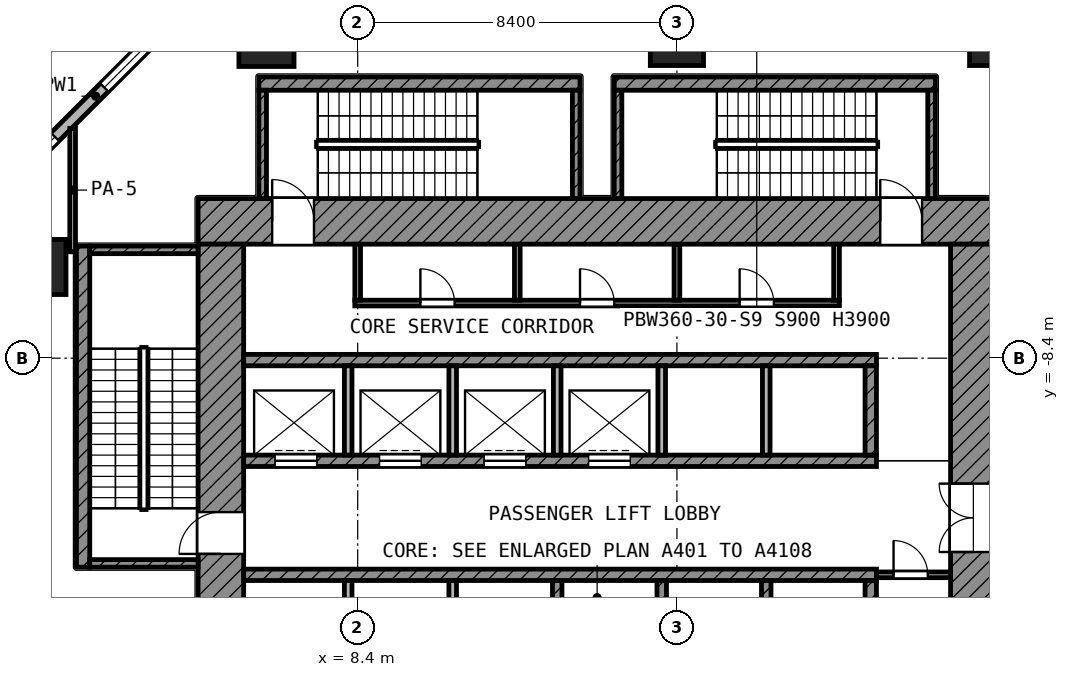
"""IFC4 building model, lengths in metres.
Left out: names, types, materials, properties, quantities, classifications, styles, units other than length and angle.
Written with IfcOpenShell. Run it as: python <this file> out.ifc"""

import sys

from ifc_helpers import new_model, si_unit, direction, frame, frame_2d, origin, origin_2d, place, context, subcontext, project, spatial, rectangle, extrude, element, fill, save


model = new_model("IFC4")
c1 = context("Model", 3, precision=1e-05, world=origin(), true_north=direction((0.0, 1.0)))
c2 = subcontext(c1, "Body", "Model", "MODEL_VIEW")
j1 = project(units=[si_unit("LENGTHUNIT", "METRE"), si_unit("PLANEANGLEUNIT", "RADIAN")], contexts=[c1])
p1 = place(None, origin())
s1 = spatial("IfcSite", under=j1, at=p1, CompositionType="ELEMENT")
p2 = place(p1, origin())
s2 = spatial("IfcBuilding", under=s1, at=p2, CompositionType="ELEMENT")
p3 = place(p2, frame((0.0, 0.0, 12.6)))
s3 = spatial("IfcBuildingStorey", under=s2, at=p3, CompositionType="ELEMENT", Elevation=12.6)
p4 = place(p3, frame((6.0, 0.0, 0.0), z_axis=(0.0, 0.0, 1.0), x_axis=(1.0, 0.0, 0.0)))
e1 = element("IfcColumn", 1, at=p4, inside=s3, PredefinedType="COLUMN", context=c2, shape_type="SweptSolid", body=[
    extrude(rectangle(XDim=1.45, YDim=1.45, at=origin_2d()), origin(), (0.0, 0.0, 1.0), 5.6),
])
for number, where, z_axis, x_axis in (
    (2, (16.8, 0.0, 0.0), (0.0, 0.0, 1.0), (1.0, 0.0, 0.0)),
    (3, (25.2, 0.0, 0.0), (0.0, 0.0, 1.0), (1.0, 0.0, 0.0)),
):
    element("IfcColumn", number, at=place(p3, frame(where, z_axis=z_axis, x_axis=x_axis)), inside=s3, PredefinedType="COLUMN", context=c2, shape_type="SweptSolid", body=[
        extrude(rectangle(XDim=1.4, YDim=1.4, at=origin_2d()), origin(), (0.0, 0.0, 1.0), 5.6),
    ])
p5 = place(p3, frame((0.0, -6.0, 0.0), z_axis=(0.0, 0.0, 1.0), x_axis=(1.0, 0.0, 0.0)))
e4 = element("IfcColumn", 4, at=p5, inside=s3, PredefinedType="COLUMN", context=c2, shape_type="SweptSolid", body=[
    extrude(rectangle(XDim=1.45, YDim=1.45, at=origin_2d()), origin(), (0.0, 0.0, 1.0), 5.6),
])
p6 = place(p3, frame((4.462, 1.45, 0.0), z_axis=(0.0, 0.0, 1.0), x_axis=(-0.707106781187, -0.707106781187, 0.0)))
e5 = element("IfcWall", 5, at=p6, inside=s3, PredefinedType="SOLIDWALL", context=c2, shape_type="SweptSolid", body=[
    extrude(rectangle(XDim=8.361, YDim=0.3, at=frame_2d((4.181, 0.0))), origin(), (0.0, 0.0, 1.0), 5.25),
])
p7 = place(p6, frame((0.259, 0.0, 0.9)))
e6 = element("IfcOpeningElement", 6, at=p7, cuts=e5, PredefinedType="OPENING", context=c2, shape_type="SweptSolid", body=[
    extrude(rectangle(XDim=3.6, YDim=3.0, at=frame_2d((1.8, 1.5))), frame((0.0, 0.16, 0.0), z_axis=(0.0, -1.0, 0.0), x_axis=(1.0, 0.0, 0.0)), (0.0, 0.0, 1.0), 0.32),
])
p8 = place(p6, frame((5.694, 0.0, 0.9)))
e7 = element("IfcOpeningElement", 7, at=p8, cuts=e5, PredefinedType="OPENING", context=c2, shape_type="SweptSolid", body=[
    extrude(rectangle(XDim=2.4, YDim=3.0, at=frame_2d((1.2, 1.5))), frame((0.0, 0.16, 0.0), z_axis=(0.0, -1.0, 0.0), x_axis=(1.0, 0.0, 0.0)), (0.0, 0.0, 1.0), 0.32),
])
p9 = place(p3, frame((4.2, -4.8, 0.0), z_axis=(0.0, 0.0, 1.0), x_axis=(1.0, 0.0, 0.0)))
e8 = element("IfcWall", 8, at=p9, inside=s3, PredefinedType="SHEAR", context=c2, shape_type="SweptSolid", body=[
    extrude(rectangle(XDim=21.0, YDim=1.2, at=frame_2d((10.5, 0.0))), origin(), (0.0, 0.0, 1.0), 5.25),
])
p10 = place(p9, frame((1.95, 0.0, 0.0)))
e9 = element("IfcOpeningElement", 9, at=p10, cuts=e8, PredefinedType="OPENING", context=c2, shape_type="SweptSolid", body=[
    extrude(rectangle(XDim=1.1, YDim=2.1, at=frame_2d((0.55, 1.05))), frame((0.0, 0.61, 0.0), z_axis=(0.0, -1.0, 0.0), x_axis=(1.0, 0.0, 0.0)), (0.0, 0.0, 1.0), 1.22),
])
p11 = place(p9, frame((17.95, 0.0, 0.0)))
e10 = element("IfcOpeningElement", 10, at=p11, cuts=e8, PredefinedType="OPENING", context=c2, shape_type="SweptSolid", body=[
    extrude(rectangle(XDim=1.1, YDim=2.1, at=frame_2d((0.55, 1.05))), frame((0.0, 0.61, 0.0), z_axis=(0.0, -1.0, 0.0), x_axis=(1.0, 0.0, 0.0)), (0.0, 0.0, 1.0), 1.22),
])
p12 = place(p3, frame((4.8, -25.2, 0.0), z_axis=(0.0, 0.0, 1.0), x_axis=(0.0, 1.0, 0.0)))
e11 = element("IfcWall", 11, at=p12, inside=s3, PredefinedType="SHEAR", context=c2, shape_type="SweptSolid", body=[
    extrude(rectangle(XDim=19.8, YDim=1.2, at=frame_2d((9.9, 0.0))), origin(), (0.0, 0.0, 1.0), 5.25),
])
p13 = place(p12, frame((11.65, 0.0, 0.0)))
e12 = element("IfcOpeningElement", 12, at=p13, cuts=e11, PredefinedType="OPENING", context=c2, shape_type="SweptSolid", body=[
    extrude(rectangle(XDim=1.1, YDim=2.1, at=frame_2d((0.55, 1.05))), frame((0.0, 0.61, 0.0), z_axis=(0.0, -1.0, 0.0), x_axis=(1.0, 0.0, 0.0)), (0.0, 0.0, 1.0), 1.22),
])
p14 = place(p12, frame((2.35, 0.0, 0.0)))
e13 = element("IfcOpeningElement", 13, at=p14, cuts=e11, PredefinedType="OPENING", context=c2, shape_type="SweptSolid", body=[
    extrude(rectangle(XDim=1.1, YDim=2.1, at=frame_2d((0.55, 1.05))), frame((0.0, 0.61, 0.0), z_axis=(0.0, -1.0, 0.0), x_axis=(1.0, 0.0, 0.0)), (0.0, 0.0, 1.0), 1.22),
])
p15 = place(p3, frame((24.6, -24.0, 0.0), z_axis=(0.0, 0.0, 1.0), x_axis=(0.0, 1.0, 0.0)))
e14 = element("IfcWall", 14, at=p15, inside=s3, PredefinedType="SHEAR", context=c2, shape_type="SweptSolid", body=[
    extrude(rectangle(XDim=18.6, YDim=1.2, at=frame_2d((9.3, 0.0))), origin(), (0.0, 0.0, 1.0), 5.25),
])
p16 = place(p15, frame((10.5, 0.0, 0.0)))
e15 = element("IfcOpeningElement", 15, at=p16, cuts=e14, PredefinedType="OPENING", context=c2, shape_type="SweptSolid", body=[
    extrude(rectangle(XDim=1.8, YDim=2.1, at=frame_2d((0.9, 1.05))), frame((0.0, 0.61, 0.0), z_axis=(0.0, -1.0, 0.0), x_axis=(1.0, 0.0, 0.0)), (0.0, 0.0, 1.0), 1.22),
])
p17 = place(p3, frame((5.4, -8.45, 0.0), z_axis=(0.0, 0.0, 1.0), x_axis=(1.0, 0.0, 0.0)))
e16 = element("IfcWall", 16, at=p17, inside=s3, PredefinedType="SHEAR", context=c2, shape_type="SweptSolid", body=[
    extrude(rectangle(XDim=16.65, YDim=0.3, at=frame_2d((8.325, 0.0))), origin(), (0.0, 0.0, 1.0), 5.25),
])
p18 = place(p3, frame((5.4, -11.1, 0.0), z_axis=(0.0, 0.0, 1.0), x_axis=(1.0, 0.0, 0.0)))
e17 = element("IfcWall", 17, at=p18, inside=s3, PredefinedType="SHEAR", context=c2, shape_type="SweptSolid", body=[
    extrude(rectangle(XDim=16.65, YDim=0.3, at=frame_2d((8.325, 0.0))), origin(), (0.0, 0.0, 1.0), 5.25),
])
p19 = place(p18, frame((0.825, 0.0, 0.0)))
e18 = element("IfcOpeningElement", 18, at=p19, cuts=e17, PredefinedType="OPENING", context=c2, shape_type="SweptSolid", body=[
    extrude(rectangle(XDim=1.1, YDim=2.1, at=frame_2d((0.55, 1.05))), frame((0.0, 0.16, 0.0), z_axis=(0.0, -1.0, 0.0), x_axis=(1.0, 0.0, 0.0)), (0.0, 0.0, 1.0), 0.32),
])
p20 = place(p18, frame((3.575, 0.0, 0.0)))
e19 = element("IfcOpeningElement", 19, at=p20, cuts=e17, PredefinedType="OPENING", context=c2, shape_type="SweptSolid", body=[
    extrude(rectangle(XDim=1.1, YDim=2.1, at=frame_2d((0.55, 1.05))), frame((0.0, 0.16, 0.0), z_axis=(0.0, -1.0, 0.0), x_axis=(1.0, 0.0, 0.0)), (0.0, 0.0, 1.0), 0.32),
])
p21 = place(p18, frame((6.325, 0.0, 0.0)))
e20 = element("IfcOpeningElement", 20, at=p21, cuts=e17, PredefinedType="OPENING", context=c2, shape_type="SweptSolid", body=[
    extrude(rectangle(XDim=1.1, YDim=2.1, at=frame_2d((0.55, 1.05))), frame((0.0, 0.16, 0.0), z_axis=(0.0, -1.0, 0.0), x_axis=(1.0, 0.0, 0.0)), (0.0, 0.0, 1.0), 0.32),
])
p22 = place(p18, frame((9.075, 0.0, 0.0)))
e21 = element("IfcOpeningElement", 21, at=p22, cuts=e17, PredefinedType="OPENING", context=c2, shape_type="SweptSolid", body=[
    extrude(rectangle(XDim=1.1, YDim=2.1, at=frame_2d((0.55, 1.05))), frame((0.0, 0.16, 0.0), z_axis=(0.0, -1.0, 0.0), x_axis=(1.0, 0.0, 0.0)), (0.0, 0.0, 1.0), 0.32),
])
p23 = place(p3, frame((5.4, -14.1, 0.0), z_axis=(0.0, 0.0, 1.0), x_axis=(1.0, 0.0, 0.0)))
e22 = element("IfcWall", 22, at=p23, inside=s3, PredefinedType="SHEAR", context=c2, shape_type="SweptSolid", body=[
    extrude(rectangle(XDim=16.65, YDim=0.3, at=frame_2d((8.325, 0.0))), origin(), (0.0, 0.0, 1.0), 5.25),
])
p24 = place(p3, frame((21.9, -10.95, 0.0), z_axis=(0.0, 0.0, 1.0), x_axis=(0.0, 1.0, 0.0)))
e23 = element("IfcWall", 23, at=p24, inside=s3, PredefinedType="SHEAR", context=c2, shape_type="SweptSolid", body=[
    extrude(rectangle(XDim=2.35, YDim=0.3, at=frame_2d((1.175, 0.0))), origin(), (0.0, 0.0, 1.0), 5.25),
])
p25 = place(p3, frame((21.9, -16.6, 0.0), z_axis=(0.0, 0.0, 1.0), x_axis=(0.0, 1.0, 0.0)))
e24 = element("IfcWall", 24, at=p25, inside=s3, PredefinedType="SHEAR", context=c2, shape_type="SweptSolid", body=[
    extrude(rectangle(XDim=2.35, YDim=0.3, at=frame_2d((1.175, 0.0))), origin(), (0.0, 0.0, 1.0), 5.25),
])
for number, where, z_axis, x_axis in (
    (25, (8.15, -10.95, 0.0), (0.0, 0.0, 1.0), (0.0, 1.0, 0.0)),
    (26, (10.9, -10.95, 0.0), (0.0, 0.0, 1.0), (0.0, 1.0, 0.0)),
    (27, (13.65, -10.95, 0.0), (0.0, 0.0, 1.0), (0.0, 1.0, 0.0)),
    (28, (16.4, -10.95, 0.0), (0.0, 0.0, 1.0), (0.0, 1.0, 0.0)),
    (29, (19.15, -10.95, 0.0), (0.0, 0.0, 1.0), (0.0, 1.0, 0.0)),
):
    element("IfcWall", number, at=place(p3, frame(where, z_axis=z_axis, x_axis=x_axis)), inside=s3, PredefinedType="PARTITIONING", context=c2, shape_type="SweptSolid", body=[
        extrude(rectangle(XDim=2.35, YDim=0.2, at=frame_2d((1.175, 0.0))), origin(), (0.0, 0.0, 1.0), 5.25),
    ])
for number, where, z_axis, x_axis in (
    (30, (8.15, -16.6, 0.0), (0.0, 0.0, 1.0), (0.0, 1.0, 0.0)),
    (31, (10.9, -16.6, 0.0), (0.0, 0.0, 1.0), (0.0, 1.0, 0.0)),
):
    element("IfcWall", number, at=place(p3, frame(where, z_axis=z_axis, x_axis=x_axis)), inside=s3, PredefinedType="PARTITIONING", context=c2, shape_type="SweptSolid", body=[
        extrude(rectangle(XDim=2.35, YDim=0.2, at=frame_2d((1.175, 0.0))), origin(), (0.0, 0.0, 1.0), 5.25),
    ])
for number, where, z_axis, x_axis in (
    (32, (13.65, -16.6, 0.0), (0.0, 0.0, 1.0), (0.0, 1.0, 0.0)),
    (33, (16.4, -16.6, 0.0), (0.0, 0.0, 1.0), (0.0, 1.0, 0.0)),
    (34, (19.15, -16.6, 0.0), (0.0, 0.0, 1.0), (0.0, 1.0, 0.0)),
):
    element("IfcWall", number, at=place(p3, frame(where, z_axis=z_axis, x_axis=x_axis)), inside=s3, PredefinedType="SHEAR", context=c2, shape_type="SweptSolid", body=[
        extrude(rectangle(XDim=2.35, YDim=0.25, at=frame_2d((1.175, 0.0))), origin(), (0.0, 0.0, 1.0), 5.25),
    ])
p26 = place(p3, frame((22.05, -14.1, 0.0), z_axis=(0.0, 0.0, 1.0), x_axis=(1.0, 0.0, 0.0)))
e35 = element("IfcWall", 35, at=p26, inside=s3, PredefinedType="PARTITIONING", context=c2, shape_type="SweptSolid", body=[
    extrude(rectangle(XDim=1.95, YDim=0.15, at=frame_2d((0.975, 0.0))), origin(), (0.0, 0.0, 1.0), 5.25),
])
p27 = place(p26, frame((0.45, 0.0, 0.0)))
e36 = element("IfcOpeningElement", 36, at=p27, cuts=e35, PredefinedType="OPENING", context=c2, shape_type="SweptSolid", body=[
    extrude(rectangle(XDim=0.9, YDim=2.1, at=frame_2d((0.45, 1.05))), frame((0.0, 0.085, 0.0), z_axis=(0.0, -1.0, 0.0), x_axis=(1.0, 0.0, 0.0)), (0.0, 0.0, 1.0), 0.17),
])
p28 = place(p3, frame((8.325, -6.95, 0.0), z_axis=(0.0, 0.0, 1.0), x_axis=(1.0, 0.0, 0.0)))
e37 = element("IfcWall", 37, at=p28, inside=s3, PredefinedType="PARTITIONING", context=c2, shape_type="SweptSolid", body=[
    extrude(rectangle(XDim=12.75, YDim=0.15, at=frame_2d((6.375, 0.0))), origin(), (0.0, 0.0, 1.0), 5.25),
])
p29 = place(p28, frame((1.725, 0.0, 0.0)))
e38 = element("IfcOpeningElement", 38, at=p29, cuts=e37, PredefinedType="OPENING", context=c2, shape_type="SweptSolid", body=[
    extrude(rectangle(XDim=0.9, YDim=2.1, at=frame_2d((0.45, 1.05))), frame((0.0, 0.085, 0.0), z_axis=(0.0, -1.0, 0.0), x_axis=(1.0, 0.0, 0.0)), (0.0, 0.0, 1.0), 0.17),
])
p30 = place(p28, frame((5.925, 0.0, 0.0)))
e39 = element("IfcOpeningElement", 39, at=p30, cuts=e37, PredefinedType="OPENING", context=c2, shape_type="SweptSolid", body=[
    extrude(rectangle(XDim=0.9, YDim=2.1, at=frame_2d((0.45, 1.05))), frame((0.0, 0.085, 0.0), z_axis=(0.0, -1.0, 0.0), x_axis=(1.0, 0.0, 0.0)), (0.0, 0.0, 1.0), 0.17),
])
p31 = place(p28, frame((10.125, 0.0, 0.0)))
e40 = element("IfcOpeningElement", 40, at=p31, cuts=e37, PredefinedType="OPENING", context=c2, shape_type="SweptSolid", body=[
    extrude(rectangle(XDim=0.9, YDim=2.1, at=frame_2d((0.45, 1.05))), frame((0.0, 0.085, 0.0), z_axis=(0.0, -1.0, 0.0), x_axis=(1.0, 0.0, 0.0)), (0.0, 0.0, 1.0), 0.17),
])
for number, where, z_axis, x_axis in (
    (41, (8.4, -6.875, 0.0), (0.0, 0.0, 1.0), (0.0, 1.0, 0.0)),
    (42, (12.6, -6.875, 0.0), (0.0, 0.0, 1.0), (0.0, 1.0, 0.0)),
    (43, (16.8, -6.875, 0.0), (0.0, 0.0, 1.0), (0.0, 1.0, 0.0)),
    (44, (21.0, -6.875, 0.0), (0.0, 0.0, 1.0), (0.0, 1.0, 0.0)),
):
    element("IfcWall", number, at=place(p3, frame(where, z_axis=z_axis, x_axis=x_axis)), inside=s3, PredefinedType="PARTITIONING", context=c2, shape_type="SweptSolid", body=[
        extrude(rectangle(XDim=1.475, YDim=0.15, at=frame_2d((0.738, 0.0))), origin(), (0.0, 0.0, 1.0), 5.25),
    ])
p32 = place(p3, frame((1.175, -13.9, 0.0), z_axis=(0.0, 0.0, 1.0), x_axis=(0.0, 1.0, 0.0)))
e45 = element("IfcWall", 45, at=p32, inside=s3, PredefinedType="SHEAR", context=c2, shape_type="SweptSolid", body=[
    extrude(rectangle(XDim=8.45, YDim=0.35, at=frame_2d((4.225, 0.0))), origin(), (0.0, 0.0, 1.0), 5.25),
])
for number, where, z_axis, x_axis in (
    (46, (1.35, -5.55, 0.0), (0.0, 0.0, 1.0), (1.0, 0.0, 0.0)),
    (47, (1.35, -13.8, 0.0), (0.0, 0.0, 1.0), (1.0, 0.0, 0.0)),
):
    element("IfcWall", number, at=place(p3, frame(where, z_axis=z_axis, x_axis=x_axis)), inside=s3, PredefinedType="SHEAR", context=c2, shape_type="SweptSolid", body=[
        extrude(rectangle(XDim=2.85, YDim=0.2, at=frame_2d((1.425, 0.0))), origin(), (0.0, 0.0, 1.0), 5.25),
    ])
p33 = place(p3, frame((5.8, -1.175, 0.0), z_axis=(0.0, 0.0, 1.0), x_axis=(1.0, 0.0, 0.0)))
e48 = element("IfcWall", 48, at=p33, inside=s3, PredefinedType="SHEAR", context=c2, shape_type="SweptSolid", body=[
    extrude(rectangle(XDim=8.45, YDim=0.35, at=frame_2d((4.225, 0.0))), origin(), (0.0, 0.0, 1.0), 5.25),
])
for number, where, z_axis, x_axis in (
    (49, (5.9, -4.2, 0.0), (0.0, 0.0, 1.0), (0.0, 1.0, 0.0)),
    (50, (14.15, -4.2, 0.0), (0.0, 0.0, 1.0), (0.0, 1.0, 0.0)),
):
    element("IfcWall", number, at=place(p3, frame(where, z_axis=z_axis, x_axis=x_axis)), inside=s3, PredefinedType="SHEAR", context=c2, shape_type="SweptSolid", body=[
        extrude(rectangle(XDim=2.85, YDim=0.2, at=frame_2d((1.425, 0.0))), origin(), (0.0, 0.0, 1.0), 5.25),
    ])
p34 = place(p3, frame((15.15, -1.175, 0.0), z_axis=(0.0, 0.0, 1.0), x_axis=(1.0, 0.0, 0.0)))
e51 = element("IfcWall", 51, at=p34, inside=s3, PredefinedType="SHEAR", context=c2, shape_type="SweptSolid", body=[
    extrude(rectangle(XDim=8.45, YDim=0.35, at=frame_2d((4.225, 0.0))), origin(), (0.0, 0.0, 1.0), 5.25),
])
for number, where, z_axis, x_axis in (
    (52, (15.25, -4.2, 0.0), (0.0, 0.0, 1.0), (0.0, 1.0, 0.0)),
    (53, (23.5, -4.2, 0.0), (0.0, 0.0, 1.0), (0.0, 1.0, 0.0)),
):
    element("IfcWall", number, at=place(p3, frame(where, z_axis=z_axis, x_axis=x_axis)), inside=s3, PredefinedType="SHEAR", context=c2, shape_type="SweptSolid", body=[
        extrude(rectangle(XDim=2.85, YDim=0.2, at=frame_2d((1.425, 0.0))), origin(), (0.0, 0.0, 1.0), 5.25),
    ])
p35 = place(p3, frame((0.9, -5.6, 0.0), z_axis=(0.0, 0.0, 1.0), x_axis=(0.0, 1.0, 0.0)))
e54 = element("IfcWall", 54, at=p35, inside=s3, PredefinedType="PARTITIONING", context=c2, shape_type="SweptSolid", body=[
    extrude(rectangle(XDim=3.247, YDim=0.15, at=frame_2d((1.624, 0.0))), origin(), (0.0, 0.0, 1.0), 3.85),
])
p36 = place(p7, origin())
e55 = element("IfcWindow", 55, at=p36, inside=s3, PartitioningType="SINGLE_PANEL", PredefinedType="WINDOW", context=c2, shape_type="SweptSolid", body=[
    extrude(rectangle(XDim=3.6, YDim=3.0, at=frame_2d((1.8, 1.5))), frame((0.0, 0.03, 0.0), z_axis=(0.0, -1.0, 0.0), x_axis=(1.0, 0.0, 0.0)), (0.0, 0.0, 1.0), 0.06),
])
fill(e6, e55)
p37 = place(p8, origin())
e56 = element("IfcWindow", 56, at=p37, inside=s3, PartitioningType="SINGLE_PANEL", PredefinedType="WINDOW", context=c2, shape_type="SweptSolid", body=[
    extrude(rectangle(XDim=2.4, YDim=3.0, at=frame_2d((1.2, 1.5))), frame((0.0, 0.03, 0.0), z_axis=(0.0, -1.0, 0.0), x_axis=(1.0, 0.0, 0.0)), (0.0, 0.0, 1.0), 0.06),
])
fill(e7, e56)
p38 = place(p19, origin())
e57 = element("IfcDoor", 57, at=p38, inside=s3, OperationType="DOUBLE_DOOR_SLIDING", PredefinedType="DOOR", context=c2, shape_type="SweptSolid", body=[
    extrude(rectangle(XDim=1.1, YDim=2.1, at=frame_2d((0.55, 1.05))), frame((0.0, 0.025, 0.0), z_axis=(0.0, -1.0, 0.0), x_axis=(1.0, 0.0, 0.0)), (0.0, 0.0, 1.0), 0.05),
])
fill(e18, e57)
p39 = place(p20, origin())
e58 = element("IfcDoor", 58, at=p39, inside=s3, OperationType="DOUBLE_DOOR_SLIDING", PredefinedType="DOOR", context=c2, shape_type="SweptSolid", body=[
    extrude(rectangle(XDim=1.1, YDim=2.1, at=frame_2d((0.55, 1.05))), frame((0.0, 0.025, 0.0), z_axis=(0.0, -1.0, 0.0), x_axis=(1.0, 0.0, 0.0)), (0.0, 0.0, 1.0), 0.05),
])
fill(e19, e58)
p40 = place(p21, origin())
e59 = element("IfcDoor", 59, at=p40, inside=s3, OperationType="DOUBLE_DOOR_SLIDING", PredefinedType="DOOR", context=c2, shape_type="SweptSolid", body=[
    extrude(rectangle(XDim=1.1, YDim=2.1, at=frame_2d((0.55, 1.05))), frame((0.0, 0.025, 0.0), z_axis=(0.0, -1.0, 0.0), x_axis=(1.0, 0.0, 0.0)), (0.0, 0.0, 1.0), 0.05),
])
fill(e20, e59)
p41 = place(p22, origin())
e60 = element("IfcDoor", 60, at=p41, inside=s3, OperationType="DOUBLE_DOOR_SLIDING", PredefinedType="DOOR", context=c2, shape_type="SweptSolid", body=[
    extrude(rectangle(XDim=1.1, YDim=2.1, at=frame_2d((0.55, 1.05))), frame((0.0, 0.025, 0.0), z_axis=(0.0, -1.0, 0.0), x_axis=(1.0, 0.0, 0.0)), (0.0, 0.0, 1.0), 0.05),
])
fill(e21, e60)
p42 = place(p13, origin())
e61 = element("IfcDoor", 61, at=p42, inside=s3, OperationType="SINGLE_SWING_LEFT", PredefinedType="DOOR", context=c2, shape_type="SweptSolid", body=[
    extrude(rectangle(XDim=1.1, YDim=2.1, at=frame_2d((0.55, 1.05))), frame((0.0, 0.025, 0.0), z_axis=(0.0, -1.0, 0.0), x_axis=(1.0, 0.0, 0.0)), (0.0, 0.0, 1.0), 0.05),
])
fill(e12, e61)
p43 = place(p10, origin())
e62 = element("IfcDoor", 62, at=p43, inside=s3, OperationType="SINGLE_SWING_LEFT", PredefinedType="DOOR", context=c2, shape_type="SweptSolid", body=[
    extrude(rectangle(XDim=1.1, YDim=2.1, at=frame_2d((0.55, 1.05))), frame((0.0, 0.025, 0.0), z_axis=(0.0, -1.0, 0.0), x_axis=(1.0, 0.0, 0.0)), (0.0, 0.0, 1.0), 0.05),
])
fill(e9, e62)
p44 = place(p11, origin())
e63 = element("IfcDoor", 63, at=p44, inside=s3, OperationType="SINGLE_SWING_LEFT", PredefinedType="DOOR", context=c2, shape_type="SweptSolid", body=[
    extrude(rectangle(XDim=1.1, YDim=2.1, at=frame_2d((0.55, 1.05))), frame((0.0, 0.025, 0.0), z_axis=(0.0, -1.0, 0.0), x_axis=(1.0, 0.0, 0.0)), (0.0, 0.0, 1.0), 0.05),
])
fill(e10, e63)
p45 = place(p16, origin())
e64 = element("IfcDoor", 64, at=p45, inside=s3, OperationType="DOUBLE_DOOR_SINGLE_SWING", PredefinedType="DOOR", context=c2, shape_type="SweptSolid", body=[
    extrude(rectangle(XDim=1.8, YDim=2.1, at=frame_2d((0.9, 1.05))), frame((0.0, 0.025, 0.0), z_axis=(0.0, -1.0, 0.0), x_axis=(1.0, 0.0, 0.0)), (0.0, 0.0, 1.0), 0.05),
])
fill(e15, e64)
p46 = place(p29, origin())
e65 = element("IfcDoor", 65, at=p46, inside=s3, OperationType="SINGLE_SWING_LEFT", PredefinedType="DOOR", context=c2, shape_type="SweptSolid", body=[
    extrude(rectangle(XDim=0.9, YDim=2.1, at=frame_2d((0.45, 1.05))), frame((0.0, 0.025, 0.0), z_axis=(0.0, -1.0, 0.0), x_axis=(1.0, 0.0, 0.0)), (0.0, 0.0, 1.0), 0.05),
])
fill(e38, e65)
p47 = place(p30, origin())
e66 = element("IfcDoor", 66, at=p47, inside=s3, OperationType="SINGLE_SWING_LEFT", PredefinedType="DOOR", context=c2, shape_type="SweptSolid", body=[
    extrude(rectangle(XDim=0.9, YDim=2.1, at=frame_2d((0.45, 1.05))), frame((0.0, 0.025, 0.0), z_axis=(0.0, -1.0, 0.0), x_axis=(1.0, 0.0, 0.0)), (0.0, 0.0, 1.0), 0.05),
])
fill(e39, e66)
p48 = place(p31, origin())
e67 = element("IfcDoor", 67, at=p48, inside=s3, OperationType="SINGLE_SWING_LEFT", PredefinedType="DOOR", context=c2, shape_type="SweptSolid", body=[
    extrude(rectangle(XDim=0.9, YDim=2.1, at=frame_2d((0.45, 1.05))), frame((0.0, 0.025, 0.0), z_axis=(0.0, -1.0, 0.0), x_axis=(1.0, 0.0, 0.0)), (0.0, 0.0, 1.0), 0.05),
])
fill(e40, e67)
p49 = place(p27, origin())
e68 = element("IfcDoor", 68, at=p49, inside=s3, OperationType="SINGLE_SWING_LEFT", PredefinedType="DOOR", context=c2, shape_type="SweptSolid", body=[
    extrude(rectangle(XDim=0.9, YDim=2.1, at=frame_2d((0.45, 1.05))), frame((0.0, 0.025, 0.0), z_axis=(0.0, -1.0, 0.0), x_axis=(1.0, 0.0, 0.0)), (0.0, 0.0, 1.0), 0.05),
])
fill(e36, e68)
save(model, sys.argv[1])
